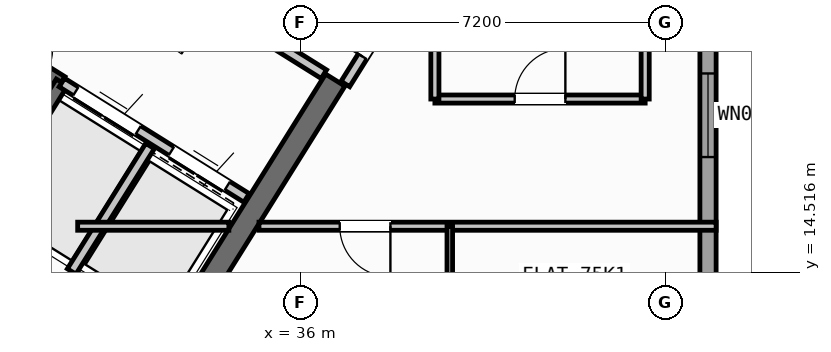
"""IFC4 building model, lengths in metres.
Left out: names, types, materials, properties, quantities, classifications, styles, units other than length and angle.
Written with IfcOpenShell. Run it as: python <this file> out.ifc"""

import sys

from ifc_helpers import new_model, si_unit, direction, frame, frame_2d, origin, place, context, subcontext, project, spatial, rectangle, extrude, source, transform, mapped, element, fill, save


model = new_model("IFC4")
c1 = context("Model", 3, precision=1e-05, world=origin(), true_north=direction((0.0, 1.0)))
c2 = subcontext(c1, "Body", "Model", "MODEL_VIEW")
j1 = project(units=[si_unit("LENGTHUNIT", "METRE"), si_unit("PLANEANGLEUNIT", "RADIAN")], contexts=[c1])
p1 = place(None, origin())
s1 = spatial("IfcSite", under=j1, at=p1, CompositionType="ELEMENT")
p2 = place(p1, origin())
s2 = spatial("IfcBuilding", under=s1, at=p2, CompositionType="ELEMENT")
p3 = place(p2, frame((0.0, 0.0, 295.2)))
s3 = spatial("IfcBuildingStorey", under=s2, at=p3, CompositionType="ELEMENT", Elevation=295.2)
p4 = place(p3, frame((33.324, 12.503, 0.0), z_axis=(0.0, 0.0, 1.0), x_axis=(-0.848043529849, 0.529926571782, 0.0)))
e1 = element("IfcWall", 1, at=p4, inside=s3, PredefinedType="SHEAR", context=c2, shape_type="SweptSolid", body=[
    extrude(rectangle(XDim=13.04, YDim=0.45, at=frame_2d((6.52, 0.0))), origin(), (0.0, 0.0, 1.0), 3.32),
])
p5 = place(p3, frame((36.683, 18.304, 0.0), z_axis=(0.0, 0.0, 1.0), x_axis=(-0.529904039071, -0.848057609704, 0.0)))
e2 = element("IfcWall", 2, at=p5, inside=s3, PredefinedType="SHEAR", context=c2, shape_type="SweptSolid", body=[
    extrude(rectangle(XDim=6.475, YDim=0.45, at=frame_2d((3.238, 0.0))), origin(), (0.0, 0.0, 1.0), 3.32),
])
p6 = place(p3, frame((44.04, 23.04, 0.0), z_axis=(0.0, 0.0, 1.0), x_axis=(0.0, -1.0, 0.0)))
e3 = element("IfcWall", 3, at=p6, inside=s3, PredefinedType="STANDARD", context=c2, shape_type="SweptSolid", body=[
    extrude(rectangle(XDim=21.08, YDim=0.32, at=frame_2d((10.54, 0.0))), origin(), (0.0, 0.0, 1.0), 3.32),
])
p7 = place(p6, frame((1.285, 0.0, 0.9)))
e4 = element("IfcOpeningElement", 4, at=p7, cuts=e3, PredefinedType="OPENING", context=c2, shape_type="SweptSolid", body=[
    extrude(rectangle(XDim=1.65, YDim=1.45, at=frame_2d((0.825, 0.725))), frame((0.0, 0.17, 0.0), z_axis=(0.0, -1.0, 0.0), x_axis=(1.0, 0.0, 0.0)), (0.0, 0.0, 1.0), 0.34),
])
p8 = place(p6, frame((4.605, 0.0, 0.9)))
e5 = element("IfcOpeningElement", 5, at=p8, cuts=e3, PredefinedType="OPENING", context=c2, shape_type="SweptSolid", body=[
    extrude(rectangle(XDim=1.65, YDim=1.45, at=frame_2d((0.825, 0.725))), frame((0.0, 0.17, 0.0), z_axis=(0.0, -1.0, 0.0), x_axis=(1.0, 0.0, 0.0)), (0.0, 0.0, 1.0), 0.34),
])
p9 = place(p6, frame((8.8, 0.0, 1.0)))
e6 = element("IfcOpeningElement", 6, at=p9, cuts=e3, PredefinedType="OPENING", context=c2, shape_type="SweptSolid", body=[
    extrude(rectangle(XDim=0.9, YDim=1.25, at=frame_2d((0.45, 0.625))), frame((0.0, 0.17, 0.0), z_axis=(0.0, -1.0, 0.0), x_axis=(1.0, 0.0, 0.0)), (0.0, 0.0, 1.0), 0.34),
])
p10 = place(p6, frame((12.114, 0.0, 1.0)))
e7 = element("IfcOpeningElement", 7, at=p10, cuts=e3, PredefinedType="OPENING", context=c2, shape_type="SweptSolid", body=[
    extrude(rectangle(XDim=0.9, YDim=1.25, at=frame_2d((0.45, 0.625))), frame((0.0, 0.17, 0.0), z_axis=(0.0, -1.0, 0.0), x_axis=(1.0, 0.0, 0.0)), (0.0, 0.0, 1.0), 0.34),
])
p11 = place(p6, frame((14.461, 0.0, 1.0)))
e8 = element("IfcOpeningElement", 8, at=p11, cuts=e3, PredefinedType="OPENING", context=c2, shape_type="SweptSolid", body=[
    extrude(rectangle(XDim=0.9, YDim=1.25, at=frame_2d((0.45, 0.625))), frame((0.0, 0.17, 0.0), z_axis=(0.0, -1.0, 0.0), x_axis=(1.0, 0.0, 0.0)), (0.0, 0.0, 1.0), 0.34),
])
p12 = place(p6, frame((18.188, 0.0, 0.9)))
e9 = element("IfcOpeningElement", 9, at=p12, cuts=e3, PredefinedType="OPENING", context=c2, shape_type="SweptSolid", body=[
    extrude(rectangle(XDim=1.35, YDim=1.45, at=frame_2d((0.675, 0.725))), frame((0.0, 0.17, 0.0), z_axis=(0.0, -1.0, 0.0), x_axis=(1.0, 0.0, 0.0)), (0.0, 0.0, 1.0), 0.34),
])
p13 = place(p3, frame((31.28, 18.261, 0.0), z_axis=(0.0, 0.0, 1.0), x_axis=(-0.848051618787, 0.529913626805, 0.0)))
e10 = element("IfcWall", 10, at=p13, inside=s3, PredefinedType="SHEAR", context=c2, shape_type="SweptSolid", body=[
    extrude(rectangle(XDim=7.46, YDim=0.26, at=frame_2d((3.73, 0.0))), origin(), (0.0, 0.0, 1.0), 3.32),
])
p14 = place(p13, frame((0.36, 0.0, 0.0)))
e11 = element("IfcOpeningElement", 11, at=p14, cuts=e10, PredefinedType="OPENING", context=c2, shape_type="SweptSolid", body=[
    extrude(rectangle(XDim=0.86, YDim=2.05, at=frame_2d((0.43, 1.025))), frame((0.0, 0.14, 0.0), z_axis=(0.0, -1.0, 0.0), x_axis=(1.0, 0.0, 0.0)), (0.0, 0.0, 1.0), 0.28),
])
p15 = place(p3, frame((31.288, 18.256, 0.0), z_axis=(0.0, 0.0, 1.0), x_axis=(-0.529943379326, -0.848033026897, 0.0)))
e12 = element("IfcWall", 12, at=p15, inside=s3, PredefinedType="SHEAR", context=c2, shape_type="SweptSolid", body=[
    extrude(rectangle(XDim=3.16, YDim=0.26, at=frame_2d((1.58, 0.0))), origin(), (0.0, 0.0, 1.0), 3.32),
])
p16 = place(p3, frame((34.933, 15.978, 0.0), z_axis=(0.0, 0.0, 1.0), x_axis=(-0.848055739377, 0.529907032327, 0.0)))
e13 = element("IfcWall", 13, at=p16, inside=s3, PredefinedType="STANDARD", context=c2, shape_type="SweptSolid", body=[
    extrude(rectangle(XDim=4.298, YDim=0.2, at=frame_2d((2.149, 0.0))), origin(), (0.0, 0.0, 1.0), 3.31),
])
p17 = place(p16, frame((0.448, 0.0, 0.0)))
e14 = element("IfcOpeningElement", 14, at=p17, cuts=e13, PredefinedType="OPENING", context=c2, shape_type="SweptSolid", body=[
    extrude(rectangle(XDim=1.3, YDim=2.2, at=frame_2d((0.65, 1.1))), frame((0.0, 0.11, 0.0), z_axis=(0.0, -1.0, 0.0), x_axis=(1.0, 0.0, 0.0)), (0.0, 0.0, 1.0), 0.22),
])
p18 = place(p16, frame((2.523, 0.0, 0.0)))
e15 = element("IfcOpeningElement", 15, at=p18, cuts=e13, PredefinedType="OPENING", context=c2, shape_type="SweptSolid", body=[
    extrude(rectangle(XDim=1.45, YDim=2.25, at=frame_2d((0.725, 1.125))), frame((0.0, 0.11, 0.0), z_axis=(0.0, -1.0, 0.0), x_axis=(1.0, 0.0, 0.0)), (0.0, 0.0, 1.0), 0.22),
])
p19 = place(p3, frame((36.459, 18.421, 0.0), z_axis=(0.0, 0.0, 1.0), x_axis=(-0.848059591691, 0.529900867089, 0.0)))
e16 = element("IfcWall", 16, at=p19, inside=s3, PredefinedType="STANDARD", context=c2, shape_type="SweptSolid", body=[
    extrude(rectangle(XDim=5.818, YDim=0.2, at=frame_2d((2.909, 0.0))), origin(), (0.0, 0.0, 1.0), 3.31),
])
p20 = place(p19, frame((2.598, 0.0, 0.0)))
e17 = element("IfcOpeningElement", 17, at=p20, cuts=e16, PredefinedType="OPENING", context=c2, shape_type="SweptSolid", body=[
    extrude(rectangle(XDim=1.15, YDim=2.1, at=frame_2d((0.575, 1.05))), frame((0.0, 0.11, 0.0), z_axis=(0.0, -1.0, 0.0), x_axis=(1.0, 0.0, 0.0)), (0.0, 0.0, 1.0), 0.22),
])
p21 = place(p3, frame((33.029, 17.003, 0.0), z_axis=(0.0, 0.0, 1.0), x_axis=(-0.529916267533, -0.848049968695, 0.0)))
e18 = element("IfcWall", 18, at=p21, inside=s3, PredefinedType="STANDARD", context=c2, shape_type="SweptSolid", body=[
    extrude(rectangle(XDim=2.92, YDim=0.2, at=frame_2d((1.46, 0.0))), origin(), (0.0, 0.0, 1.0), 3.31),
])
p22 = place(p3, frame((32.164, 10.374, 0.0), z_axis=(0.0, 0.0, 1.0), x_axis=(-0.848044107957, 0.529925646633, 0.0)))
e19 = element("IfcWall", 19, at=p22, inside=s3, PredefinedType="PARTITIONING", context=c2, shape_type="SweptSolid", body=[
    extrude(rectangle(XDim=15.57, YDim=0.16, at=frame_2d((7.785, 0.0))), origin(), (0.0, 0.0, 1.0), 3.31),
])
p23 = place(p22, frame((10.83, 0.0, 0.0)))
e20 = element("IfcOpeningElement", 20, at=p23, cuts=e19, PredefinedType="OPENING", context=c2, shape_type="SweptSolid", body=[
    extrude(rectangle(XDim=1.0, YDim=2.1, at=frame_2d((0.5, 1.05))), frame((0.0, 0.09, 0.0), z_axis=(0.0, -1.0, 0.0), x_axis=(1.0, 0.0, 0.0)), (0.0, 0.0, 1.0), 0.18),
])
p24 = place(p3, frame((38.451, 20.737, 0.0), z_axis=(0.0, 0.0, 1.0), x_axis=(-0.529924799939, -0.848044637038, 0.0)))
e21 = element("IfcWall", 21, at=p24, inside=s3, PredefinedType="STANDARD", context=c2, shape_type="SweptSolid", body=[
    extrude(rectangle(XDim=2.96, YDim=0.2, at=frame_2d((1.48, 0.0))), origin(), (0.0, 0.0, 1.0), 3.31),
])
p25 = place(p24, frame((1.46, 0.0, 0.0)))
e22 = element("IfcOpeningElement", 22, at=p25, cuts=e21, PredefinedType="OPENING", context=c2, shape_type="SweptSolid", body=[
    extrude(rectangle(XDim=0.86, YDim=2.05, at=frame_2d((0.43, 1.025))), frame((0.0, 0.11, 0.0), z_axis=(0.0, -1.0, 0.0), x_axis=(1.0, 0.0, 0.0)), (0.0, 0.0, 1.0), 0.22),
])
p26 = place(p3, frame((31.6, 15.42, 0.0), z_axis=(0.0, 0.0, 1.0), x_axis=(1.0, 0.0, 0.0)))
e23 = element("IfcWall", 23, at=p26, inside=s3, PredefinedType="PARTITIONING", context=c2, shape_type="SweptSolid", body=[
    extrude(rectangle(XDim=2.984, YDim=0.16, at=frame_2d((1.492, 0.0))), origin(), (0.0, 0.0, 1.0), 3.31),
])
p27 = place(p3, frame((35.178, 15.42, 0.0), z_axis=(0.0, 0.0, 1.0), x_axis=(1.0, 0.0, 0.0)))
e24 = element("IfcWall", 24, at=p27, inside=s3, PredefinedType="PARTITIONING", context=c2, shape_type="SweptSolid", body=[
    extrude(rectangle(XDim=9.021, YDim=0.16, at=frame_2d((4.511, 0.0))), origin(), (0.0, 0.0, 1.0), 3.31),
])
p28 = place(p27, frame((1.594, 0.0, 0.0)))
e25 = element("IfcOpeningElement", 25, at=p28, cuts=e24, PredefinedType="OPENING", context=c2, shape_type="SweptSolid", body=[
    extrude(rectangle(XDim=1.0, YDim=2.1, at=frame_2d((0.5, 1.05))), frame((0.0, 0.09, 0.0), z_axis=(0.0, -1.0, 0.0), x_axis=(1.0, 0.0, 0.0)), (0.0, 0.0, 1.0), 0.18),
])
p29 = place(p3, frame((38.65, 17.93, 0.0), z_axis=(0.0, 0.0, 1.0), x_axis=(1.0, 0.0, 0.0)))
e26 = element("IfcWall", 26, at=p29, inside=s3, PredefinedType="PARTITIONING", context=c2, shape_type="SweptSolid", body=[
    extrude(rectangle(XDim=4.15, YDim=0.16, at=frame_2d((2.075, 0.0))), origin(), (0.0, 0.0, 1.0), 3.31),
])
p30 = place(p29, frame((1.575, 0.0, 0.0)))
e27 = element("IfcOpeningElement", 27, at=p30, cuts=e26, PredefinedType="OPENING", context=c2, shape_type="SweptSolid", body=[
    extrude(rectangle(XDim=1.0, YDim=2.1, at=frame_2d((0.5, 1.05))), frame((0.0, 0.09, 0.0), z_axis=(0.0, -1.0, 0.0), x_axis=(1.0, 0.0, 0.0)), (0.0, 0.0, 1.0), 0.18),
])
p31 = place(p3, frame((38.65, 17.93, 0.0), z_axis=(0.0, 0.0, 1.0), x_axis=(0.0, 1.0, 0.0)))
e28 = element("IfcWall", 28, at=p31, inside=s3, PredefinedType="PARTITIONING", context=c2, shape_type="SweptSolid", body=[
    extrude(rectangle(XDim=3.046, YDim=0.16, at=frame_2d((1.523, 0.0))), origin(), (0.0, 0.0, 1.0), 3.31),
])
p32 = place(p3, frame((42.8, 17.93, 0.0), z_axis=(0.0, 0.0, 1.0), x_axis=(0.0, 1.0, 0.0)))
e29 = element("IfcWall", 29, at=p32, inside=s3, PredefinedType="PARTITIONING", context=c2, shape_type="SweptSolid", body=[
    extrude(rectangle(XDim=3.57, YDim=0.16, at=frame_2d((1.785, 0.0))), origin(), (0.0, 0.0, 1.0), 3.31),
])
p33 = place(p3, frame((38.944, 1.96, 0.0), z_axis=(0.0, 0.0, 1.0), x_axis=(0.0, 1.0, 0.0)))
e30 = element("IfcWall", 30, at=p33, inside=s3, PredefinedType="PARTITIONING", context=c2, shape_type="SweptSolid", body=[
    extrude(rectangle(XDim=13.46, YDim=0.11, at=frame_2d((6.73, 0.0))), origin(), (0.0, 0.0, 1.0), 3.31),
])
p34 = place(p33, frame((5.5, 0.0, 0.0)))
e31 = element("IfcOpeningElement", 31, at=p34, cuts=e30, PredefinedType="OPENING", context=c2, shape_type="SweptSolid", body=[
    extrude(rectangle(XDim=0.92, YDim=2.08, at=frame_2d((0.46, 1.04))), frame((0.0, 0.065, 0.0), z_axis=(0.0, -1.0, 0.0), x_axis=(1.0, 0.0, 0.0)), (0.0, 0.0, 1.0), 0.13),
])
p35 = place(p33, frame((10.67, 0.0, 0.0)))
e32 = element("IfcOpeningElement", 32, at=p35, cuts=e30, PredefinedType="OPENING", context=c2, shape_type="SweptSolid", body=[
    extrude(rectangle(XDim=0.88, YDim=2.08, at=frame_2d((0.44, 1.04))), frame((0.0, 0.065, 0.0), z_axis=(0.0, -1.0, 0.0), x_axis=(1.0, 0.0, 0.0)), (0.0, 0.0, 1.0), 0.13),
])
m1 = source(origin(), c2, "Body", "SweptSolid", [
    extrude(rectangle(XDim=1.65, YDim=1.45, at=frame_2d((0.825, 0.725))), frame((0.0, 0.03, 0.0), z_axis=(0.0, -1.0, 0.0), x_axis=(1.0, 0.0, 0.0)), (0.0, 0.0, 1.0), 0.06),
])
p36 = place(p8, origin())
e33 = element("IfcWindow", 33, at=p36, inside=s3, PartitioningType="SINGLE_PANEL", PredefinedType="WINDOW", context=c2, shape_type="MappedRepresentation", body=[
    mapped(m1, transform((0.0, 0.0, 0.0), scale=1.0)),
])
fill(e5, e33)
m2 = source(origin(), c2, "Body", "SweptSolid", [
    extrude(rectangle(XDim=1.3, YDim=2.2, at=frame_2d((0.65, 1.1))), frame((0.0, 0.025, 0.0), z_axis=(0.0, -1.0, 0.0), x_axis=(1.0, 0.0, 0.0)), (0.0, 0.0, 1.0), 0.05),
])
p37 = place(p17, origin())
e34 = element("IfcDoor", 34, at=p37, inside=s3, OperationType="DOUBLE_DOOR_SLIDING", PredefinedType="DOOR", context=c2, shape_type="MappedRepresentation", body=[
    mapped(m2, transform((0.0, 0.0, 0.0), scale=1.0)),
])
fill(e14, e34)
m3 = source(origin(), c2, "Body", "SweptSolid", [
    extrude(rectangle(XDim=1.45, YDim=2.25, at=frame_2d((0.725, 1.125))), frame((0.0, 0.025, 0.0), z_axis=(0.0, -1.0, 0.0), x_axis=(1.0, 0.0, 0.0)), (0.0, 0.0, 1.0), 0.05),
])
p38 = place(p18, origin())
e35 = element("IfcDoor", 35, at=p38, inside=s3, OperationType="DOUBLE_DOOR_SLIDING", PredefinedType="DOOR", context=c2, shape_type="MappedRepresentation", body=[
    mapped(m3, transform((0.0, 0.0, 0.0), scale=1.0)),
])
fill(e15, e35)
m4 = source(origin(), c2, "Body", "SweptSolid", [
    extrude(rectangle(XDim=1.0, YDim=2.1, at=frame_2d((0.5, 1.05))), frame((0.0, 0.025, 0.0), z_axis=(0.0, -1.0, 0.0), x_axis=(1.0, 0.0, 0.0)), (0.0, 0.0, 1.0), 0.05),
])
p39 = place(p30, origin())
e36 = element("IfcDoor", 36, at=p39, inside=s3, OperationType="SINGLE_SWING_RIGHT", PredefinedType="DOOR", context=c2, shape_type="MappedRepresentation", body=[
    mapped(m4, transform((0.0, 0.0, 0.0), scale=1.0)),
])
fill(e27, e36)
m5 = source(origin(), c2, "Body", "SweptSolid", [
    extrude(rectangle(XDim=0.86, YDim=2.05, at=frame_2d((0.43, 1.025))), frame((0.0, 0.025, 0.0), z_axis=(0.0, -1.0, 0.0), x_axis=(1.0, 0.0, 0.0)), (0.0, 0.0, 1.0), 0.05),
])
p40 = place(p25, frame((0.86, 0.0, 0.0), z_axis=(0.0, 0.0, 1.0), x_axis=(-1.0, 0.0, 0.0)))
e37 = element("IfcDoor", 37, at=p40, inside=s3, OperationType="SINGLE_SWING_LEFT", PredefinedType="DOOR", context=c2, shape_type="MappedRepresentation", body=[
    mapped(m5, transform((0.0, 0.0, 0.0), scale=1.0)),
])
fill(e22, e37)
p41 = place(p28, frame((1.0, 0.0, 0.0), z_axis=(0.0, 0.0, 1.0), x_axis=(-1.0, 0.0, 0.0)))
e38 = element("IfcDoor", 38, at=p41, inside=s3, OperationType="SINGLE_SWING_LEFT", PredefinedType="DOOR", context=c2, shape_type="MappedRepresentation", body=[
    mapped(m4, transform((0.0, 0.0, 0.0), scale=1.0)),
])
fill(e25, e38)
save(model, sys.argv[1])
